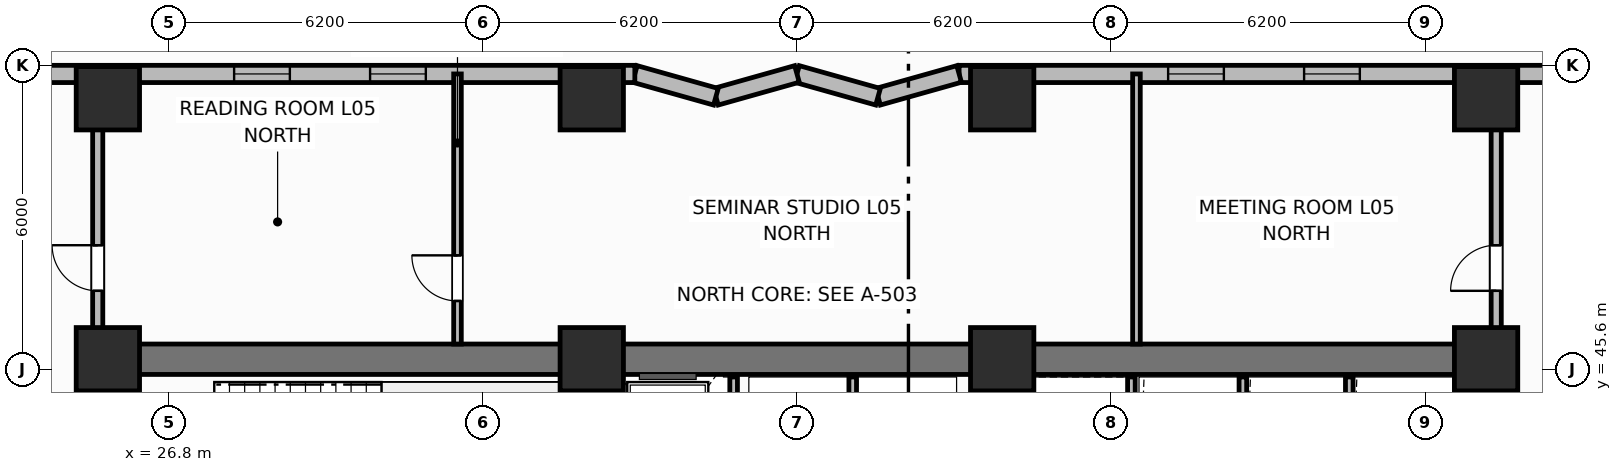
"""IFC4 building model, lengths in metres.
Left out: names, types, materials, properties, quantities, classifications, styles, units other than length and angle.
Written with IfcOpenShell. Run it as: python <this file> out.ifc"""

import sys

from ifc_helpers import new_model, si_unit, direction, frame, frame_2d, origin, origin_2d, place, context, subcontext, project, spatial, rectangle, extrude, element, fill, save


model = new_model("IFC4")
c1 = context("Model", 3, precision=1e-05, world=origin(), true_north=direction((0.0, 1.0)))
c2 = subcontext(c1, "Body", "Model", "MODEL_VIEW")
j1 = project(units=[si_unit("LENGTHUNIT", "METRE"), si_unit("PLANEANGLEUNIT", "RADIAN")], contexts=[c1])
p1 = place(None, origin())
s1 = spatial("IfcSite", under=j1, at=p1, CompositionType="ELEMENT")
p2 = place(p1, origin())
s2 = spatial("IfcBuilding", under=s1, at=p2, CompositionType="ELEMENT")
p3 = place(p2, frame((0.0, 0.0, 24.6)))
s3 = spatial("IfcBuildingStorey", under=s2, at=p3, CompositionType="ELEMENT", Elevation=24.6)
p4 = place(p3, frame((25.6, 45.8, 0.0), z_axis=(0.0, 0.0, 1.0), x_axis=(1.0, 0.0, 0.0)))
e1 = element("IfcWall", 1, at=p4, inside=s3, PredefinedType="SHEAR", context=c2, shape_type="SweptSolid", body=[
    extrude(rectangle(XDim=27.2, YDim=0.6, at=frame_2d((13.6, 0.0))), origin(), (0.0, 0.0, 1.0), 4.2),
])
for number, where, z_axis, x_axis in (
    (2, (25.6, 39.9, 0.0), (0.0, 0.0, 1.0), (0.0, 1.0, 0.0)),
    (3, (52.8, 39.9, 0.0), (0.0, 0.0, 1.0), (0.0, 1.0, 0.0)),
):
    element("IfcWall", number, at=place(p3, frame(where, z_axis=z_axis, x_axis=x_axis)), inside=s3, PredefinedType="SHEAR", context=c2, shape_type="SweptSolid", body=[
        extrude(rectangle(XDim=5.6, YDim=0.6, at=frame_2d((2.8, 0.0))), origin(), (0.0, 0.0, 1.0), 4.2),
    ])
for number, where, z_axis, x_axis in (
    (4, (35.15, 39.9, 0.0), (0.0, 0.0, 1.0), (0.0, 1.0, 0.0)),
    (5, (43.25, 39.9, 0.0), (0.0, 0.0, 1.0), (0.0, 1.0, 0.0)),
):
    element("IfcWall", number, at=place(p3, frame(where, z_axis=z_axis, x_axis=x_axis)), inside=s3, PredefinedType="SHEAR", context=c2, shape_type="SweptSolid", body=[
        extrude(rectangle(XDim=5.6, YDim=0.4, at=frame_2d((2.8, 0.0))), origin(), (0.0, 0.0, 1.0), 4.2),
    ])
for number, where, z_axis, x_axis in (
    (6, (25.6, 45.8, 0.0), (0.0, 0.0, 1.0), (1.0, 0.0, 0.0)),
    (7, (35.15, 45.8, 0.0), (0.0, 0.0, 1.0), (1.0, 0.0, 0.0)),
    (8, (43.25, 45.8, 0.0), (0.0, 0.0, 1.0), (1.0, 0.0, 0.0)),
    (9, (52.8, 45.8, 0.0), (0.0, 0.0, 1.0), (1.0, 0.0, 0.0)),
    (10, (25.6, 50.95, 0.0), (0.0, 0.0, 1.0), (1.0, 0.0, 0.0)),
    (11, (35.15, 50.95, 0.0), (0.0, 0.0, 1.0), (1.0, 0.0, 0.0)),
    (12, (43.25, 50.95, 0.0), (0.0, 0.0, 1.0), (1.0, 0.0, 0.0)),
    (13, (52.8, 50.95, 0.0), (0.0, 0.0, 1.0), (1.0, 0.0, 0.0)),
):
    element("IfcColumn", number, at=place(p3, frame(where, z_axis=z_axis, x_axis=x_axis)), inside=s3, PredefinedType="COLUMN", context=c2, shape_type="SweptSolid", body=[
        extrude(rectangle(XDim=1.25, YDim=1.25, at=origin_2d()), origin(), (0.0, 0.0, 1.0), 4.2),
    ])
p5 = place(p3, frame((59.8, 51.43, 0.0), z_axis=(0.0, 0.0, 1.0), x_axis=(-1.0, 0.0, 0.0)))
e14 = element("IfcWall", 14, at=p5, inside=s3, PredefinedType="SOLIDWALL", context=c2, shape_type="SweptSolid", body=[
    extrude(rectangle(XDim=17.4, YDim=0.34, at=frame_2d((8.7, 0.0))), origin(), (0.0, 0.0, 1.0), 3.2),
])
p6 = place(p5, frame((1.442, 0.0, 0.95)))
e15 = element("IfcOpeningElement", 15, at=p6, cuts=e14, PredefinedType="OPENING", context=c2, shape_type="SweptSolid", body=[
    extrude(rectangle(XDim=1.1, YDim=1.65, at=frame_2d((0.55, 0.825))), frame((0.0, 0.18, 0.0), z_axis=(0.0, -1.0, 0.0), x_axis=(1.0, 0.0, 0.0)), (0.0, 0.0, 1.0), 0.36),
])
p7 = place(p5, frame((4.475, 0.0, 0.95)))
e16 = element("IfcOpeningElement", 16, at=p7, cuts=e14, PredefinedType="OPENING", context=c2, shape_type="SweptSolid", body=[
    extrude(rectangle(XDim=1.1, YDim=1.65, at=frame_2d((0.55, 0.825))), frame((0.0, 0.18, 0.0), z_axis=(0.0, -1.0, 0.0), x_axis=(1.0, 0.0, 0.0)), (0.0, 0.0, 1.0), 0.36),
])
p8 = place(p5, frame((9.492, 0.0, 0.95)))
e17 = element("IfcOpeningElement", 17, at=p8, cuts=e14, PredefinedType="OPENING", context=c2, shape_type="SweptSolid", body=[
    extrude(rectangle(XDim=1.1, YDim=1.65, at=frame_2d((0.55, 0.825))), frame((0.0, 0.18, 0.0), z_axis=(0.0, -1.0, 0.0), x_axis=(1.0, 0.0, 0.0)), (0.0, 0.0, 1.0), 0.36),
])
p9 = place(p5, frame((12.175, 0.0, 0.95)))
e18 = element("IfcOpeningElement", 18, at=p9, cuts=e14, PredefinedType="OPENING", context=c2, shape_type="SweptSolid", body=[
    extrude(rectangle(XDim=1.1, YDim=1.65, at=frame_2d((0.55, 0.825))), frame((0.0, 0.18, 0.0), z_axis=(0.0, -1.0, 0.0), x_axis=(1.0, 0.0, 0.0)), (0.0, 0.0, 1.0), 0.36),
])
p10 = place(p3, frame((42.4, 51.43, 0.0), z_axis=(0.0, 0.0, 1.0), x_axis=(-0.962652136636, -0.270741322725, 0.0)))
e19 = element("IfcWall", 19, at=p10, inside=s3, PredefinedType="SOLIDWALL", context=c2, shape_type="SweptSolid", body=[
    extrude(rectangle(XDim=1.662, YDim=0.34, at=frame_2d((0.831, 0.0))), origin(), (0.0, 0.0, 1.0), 3.2),
])
p11 = place(p3, frame((40.8, 50.98, 0.0), z_axis=(0.0, 0.0, 1.0), x_axis=(-0.962662902433, 0.270703040766, 0.0)))
e20 = element("IfcWall", 20, at=p11, inside=s3, PredefinedType="SOLIDWALL", context=c2, shape_type="SweptSolid", body=[
    extrude(rectangle(XDim=1.662, YDim=0.34, at=frame_2d((0.831, 0.0))), origin(), (0.0, 0.0, 1.0), 3.2),
])
p12 = place(p3, frame((39.2, 51.43, 0.0), z_axis=(0.0, 0.0, 1.0), x_axis=(-0.962652136636, -0.270741322725, 0.0)))
e21 = element("IfcWall", 21, at=p12, inside=s3, PredefinedType="SOLIDWALL", context=c2, shape_type="SweptSolid", body=[
    extrude(rectangle(XDim=1.662, YDim=0.34, at=frame_2d((0.831, 0.0))), origin(), (0.0, 0.0, 1.0), 3.2),
])
p13 = place(p3, frame((37.6, 50.98, 0.0), z_axis=(0.0, 0.0, 1.0), x_axis=(-0.962662902433, 0.270703040766, 0.0)))
e22 = element("IfcWall", 22, at=p13, inside=s3, PredefinedType="SOLIDWALL", context=c2, shape_type="SweptSolid", body=[
    extrude(rectangle(XDim=1.662, YDim=0.34, at=frame_2d((0.831, 0.0))), origin(), (0.0, 0.0, 1.0), 3.2),
])
p14 = place(p3, frame((36.0, 51.43, 0.0), z_axis=(0.0, 0.0, 1.0), x_axis=(-1.0, 0.0, 0.0)))
e23 = element("IfcWall", 23, at=p14, inside=s3, PredefinedType="SOLIDWALL", context=c2, shape_type="SweptSolid", body=[
    extrude(rectangle(XDim=17.4, YDim=0.34, at=frame_2d((8.7, 0.0))), origin(), (0.0, 0.0, 1.0), 3.2),
])
p15 = place(p14, frame((4.125, 0.0, 0.95)))
e24 = element("IfcOpeningElement", 24, at=p15, cuts=e23, PredefinedType="OPENING", context=c2, shape_type="SweptSolid", body=[
    extrude(rectangle(XDim=1.1, YDim=1.65, at=frame_2d((0.55, 0.825))), frame((0.0, 0.18, 0.0), z_axis=(0.0, -1.0, 0.0), x_axis=(1.0, 0.0, 0.0)), (0.0, 0.0, 1.0), 0.36),
])
p16 = place(p14, frame((6.808, 0.0, 0.95)))
e25 = element("IfcOpeningElement", 25, at=p16, cuts=e23, PredefinedType="OPENING", context=c2, shape_type="SweptSolid", body=[
    extrude(rectangle(XDim=1.1, YDim=1.65, at=frame_2d((0.55, 0.825))), frame((0.0, 0.18, 0.0), z_axis=(0.0, -1.0, 0.0), x_axis=(1.0, 0.0, 0.0)), (0.0, 0.0, 1.0), 0.36),
])
p17 = place(p14, frame((11.825, 0.0, 0.95)))
e26 = element("IfcOpeningElement", 26, at=p17, cuts=e23, PredefinedType="OPENING", context=c2, shape_type="SweptSolid", body=[
    extrude(rectangle(XDim=1.1, YDim=1.65, at=frame_2d((0.55, 0.825))), frame((0.0, 0.18, 0.0), z_axis=(0.0, -1.0, 0.0), x_axis=(1.0, 0.0, 0.0)), (0.0, 0.0, 1.0), 0.36),
])
p18 = place(p14, frame((14.858, 0.0, 0.95)))
e27 = element("IfcOpeningElement", 27, at=p18, cuts=e23, PredefinedType="OPENING", context=c2, shape_type="SweptSolid", body=[
    extrude(rectangle(XDim=1.1, YDim=1.65, at=frame_2d((0.55, 0.825))), frame((0.0, 0.18, 0.0), z_axis=(0.0, -1.0, 0.0), x_axis=(1.0, 0.0, 0.0)), (0.0, 0.0, 1.0), 0.36),
])
p19 = place(p3, frame((37.95, 42.6, 0.0), z_axis=(0.0, 0.0, 1.0), x_axis=(0.0, 1.0, 0.0)))
e28 = element("IfcWall", 28, at=p19, inside=s3, PredefinedType="PARTITIONING", context=c2, shape_type="SweptSolid", body=[
    extrude(rectangle(XDim=2.85, YDim=0.15, at=frame_2d((1.425, 0.0))), origin(), (0.0, 0.0, 1.0), 3.03),
])
for number, where, z_axis, x_axis in (
    (29, (40.3, 42.65, 0.0), (0.0, 0.0, 1.0), (0.0, 1.0, 0.0)),
    (30, (45.8, 42.65, 0.0), (0.0, 0.0, 1.0), (0.0, 1.0, 0.0)),
    (31, (48.0, 42.65, 0.0), (0.0, 0.0, 1.0), (0.0, 1.0, 0.0)),
    (32, (50.1, 42.65, 0.0), (0.0, 0.0, 1.0), (0.0, 1.0, 0.0)),
):
    element("IfcWall", number, at=place(p3, frame(where, z_axis=z_axis, x_axis=x_axis)), inside=s3, PredefinedType="PARTITIONING", context=c2, shape_type="SweptSolid", body=[
        extrude(rectangle(XDim=2.8, YDim=0.15, at=frame_2d((1.4, 0.0))), origin(), (0.0, 0.0, 1.0), 3.03),
    ])
p20 = place(p3, frame((32.5, 46.1, 0.0), z_axis=(0.0, 0.0, 1.0), x_axis=(0.0, 1.0, 0.0)))
e33 = element("IfcWall", 33, at=p20, inside=s3, PredefinedType="PARTITIONING", context=c2, shape_type="SweptSolid", body=[
    extrude(rectangle(XDim=5.33, YDim=0.15, at=frame_2d((2.665, 0.0))), origin(), (0.0, 0.0, 1.0), 3.03),
])
p21 = place(p20, frame((0.85, 0.0, 0.0)))
e34 = element("IfcOpeningElement", 34, at=p21, cuts=e33, PredefinedType="OPENING", context=c2, shape_type="SweptSolid", body=[
    extrude(rectangle(XDim=0.9, YDim=2.1, at=frame_2d((0.45, 1.05))), frame((0.0, 0.085, 0.0), z_axis=(0.0, -1.0, 0.0), x_axis=(1.0, 0.0, 0.0)), (0.0, 0.0, 1.0), 0.17),
])
p22 = place(p3, frame((45.9, 46.1, 0.0), z_axis=(0.0, 0.0, 1.0), x_axis=(0.0, 1.0, 0.0)))
e35 = element("IfcWall", 35, at=p22, inside=s3, PredefinedType="PARTITIONING", context=c2, shape_type="SweptSolid", body=[
    extrude(rectangle(XDim=5.33, YDim=0.15, at=frame_2d((2.665, 0.0))), origin(), (0.0, 0.0, 1.0), 3.03),
])
p23 = place(p3, frame((25.4, 46.1, 0.0), z_axis=(0.0, 0.0, 1.0), x_axis=(0.0, 1.0, 0.0)))
e36 = element("IfcWall", 36, at=p23, inside=s3, PredefinedType="PARTITIONING", context=c2, shape_type="SweptSolid", body=[
    extrude(rectangle(XDim=4.83, YDim=0.2, at=frame_2d((2.415, 0.0))), origin(), (0.0, 0.0, 1.0), 3.03),
])
p24 = place(p23, frame((1.05, 0.0, 0.0)))
e37 = element("IfcOpeningElement", 37, at=p24, cuts=e36, PredefinedType="OPENING", context=c2, shape_type="SweptSolid", body=[
    extrude(rectangle(XDim=0.9, YDim=2.1, at=frame_2d((0.45, 1.05))), frame((0.0, 0.11, 0.0), z_axis=(0.0, -1.0, 0.0), x_axis=(1.0, 0.0, 0.0)), (0.0, 0.0, 1.0), 0.22),
])
p25 = place(p3, frame((53.0, 46.1, 0.0), z_axis=(0.0, 0.0, 1.0), x_axis=(0.0, 1.0, 0.0)))
e38 = element("IfcWall", 38, at=p25, inside=s3, PredefinedType="PARTITIONING", context=c2, shape_type="SweptSolid", body=[
    extrude(rectangle(XDim=4.83, YDim=0.2, at=frame_2d((2.415, 0.0))), origin(), (0.0, 0.0, 1.0), 3.03),
])
p26 = place(p25, frame((1.05, 0.0, 0.0)))
e39 = element("IfcOpeningElement", 39, at=p26, cuts=e38, PredefinedType="OPENING", context=c2, shape_type="SweptSolid", body=[
    extrude(rectangle(XDim=0.9, YDim=2.1, at=frame_2d((0.45, 1.05))), frame((0.0, 0.11, 0.0), z_axis=(0.0, -1.0, 0.0), x_axis=(1.0, 0.0, 0.0)), (0.0, 0.0, 1.0), 0.22),
])
p27 = place(p8, origin())
e40 = element("IfcWindow", 40, at=p27, inside=s3, PartitioningType="SINGLE_PANEL", PredefinedType="WINDOW", context=c2, shape_type="SweptSolid", body=[
    extrude(rectangle(XDim=1.1, YDim=1.65, at=frame_2d((0.55, 0.825))), frame((0.0, 0.03, 0.0), z_axis=(0.0, -1.0, 0.0), x_axis=(1.0, 0.0, 0.0)), (0.0, 0.0, 1.0), 0.06),
])
fill(e17, e40)
p28 = place(p9, origin())
e41 = element("IfcWindow", 41, at=p28, inside=s3, PartitioningType="SINGLE_PANEL", PredefinedType="WINDOW", context=c2, shape_type="SweptSolid", body=[
    extrude(rectangle(XDim=1.1, YDim=1.65, at=frame_2d((0.55, 0.825))), frame((0.0, 0.03, 0.0), z_axis=(0.0, -1.0, 0.0), x_axis=(1.0, 0.0, 0.0)), (0.0, 0.0, 1.0), 0.06),
])
fill(e18, e41)
p29 = place(p15, origin())
e42 = element("IfcWindow", 42, at=p29, inside=s3, PartitioningType="SINGLE_PANEL", PredefinedType="WINDOW", context=c2, shape_type="SweptSolid", body=[
    extrude(rectangle(XDim=1.1, YDim=1.65, at=frame_2d((0.55, 0.825))), frame((0.0, 0.03, 0.0), z_axis=(0.0, -1.0, 0.0), x_axis=(1.0, 0.0, 0.0)), (0.0, 0.0, 1.0), 0.06),
])
fill(e24, e42)
p30 = place(p16, origin())
e43 = element("IfcWindow", 43, at=p30, inside=s3, PartitioningType="SINGLE_PANEL", PredefinedType="WINDOW", context=c2, shape_type="SweptSolid", body=[
    extrude(rectangle(XDim=1.1, YDim=1.65, at=frame_2d((0.55, 0.825))), frame((0.0, 0.03, 0.0), z_axis=(0.0, -1.0, 0.0), x_axis=(1.0, 0.0, 0.0)), (0.0, 0.0, 1.0), 0.06),
])
fill(e25, e43)
p31 = place(p21, origin())
e44 = element("IfcDoor", 44, at=p31, inside=s3, OperationType="SINGLE_SWING_RIGHT", PredefinedType="DOOR", context=c2, shape_type="SweptSolid", body=[
    extrude(rectangle(XDim=0.9, YDim=2.1, at=frame_2d((0.45, 1.05))), frame((0.0, 0.025, 0.0), z_axis=(0.0, -1.0, 0.0), x_axis=(1.0, 0.0, 0.0)), (0.0, 0.0, 1.0), 0.05),
])
fill(e34, e44)
p32 = place(p24, origin())
e45 = element("IfcDoor", 45, at=p32, inside=s3, OperationType="SINGLE_SWING_RIGHT", PredefinedType="DOOR", context=c2, shape_type="SweptSolid", body=[
    extrude(rectangle(XDim=0.9, YDim=2.1, at=frame_2d((0.45, 1.05))), frame((0.0, 0.025, 0.0), z_axis=(0.0, -1.0, 0.0), x_axis=(1.0, 0.0, 0.0)), (0.0, 0.0, 1.0), 0.05),
])
fill(e37, e45)
p33 = place(p26, origin())
e46 = element("IfcDoor", 46, at=p33, inside=s3, OperationType="SINGLE_SWING_LEFT", PredefinedType="DOOR", context=c2, shape_type="SweptSolid", body=[
    extrude(rectangle(XDim=0.9, YDim=2.1, at=frame_2d((0.45, 1.05))), frame((0.0, 0.025, 0.0), z_axis=(0.0, -1.0, 0.0), x_axis=(1.0, 0.0, 0.0)), (0.0, 0.0, 1.0), 0.05),
])
fill(e39, e46)
save(model, sys.argv[1])
